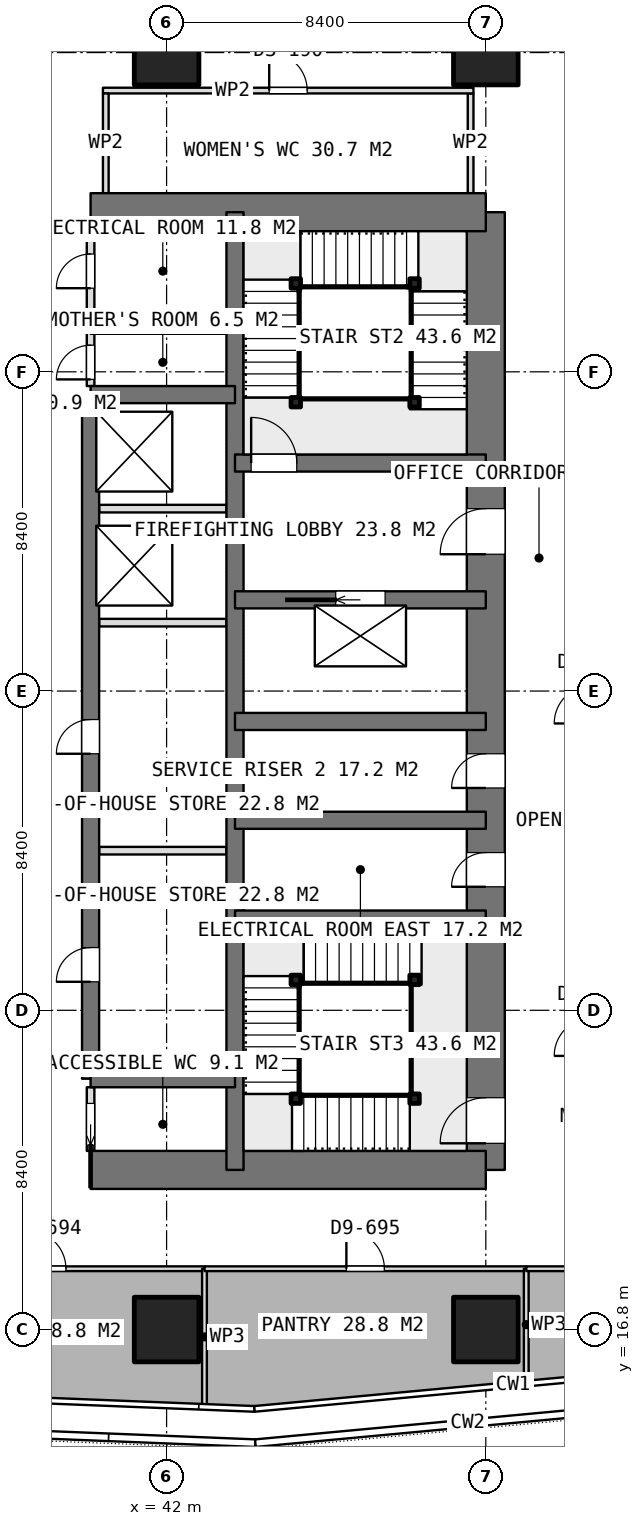
"""IFC4 building model, lengths in metres.
Left out: names, types, materials, properties, quantities, classifications, styles, units other than length and angle.
Written with IfcOpenShell. Run it as: python <this file> out.ifc"""

import sys

from ifc_helpers import new_model, si_unit, direction, frame, frame_2d, origin, origin_2d, place, context, subcontext, project, spatial, rectangle, extrude, element, fill, save


model = new_model("IFC4")
c1 = context("Model", 3, precision=1e-05, world=origin(), true_north=direction((0.0, 1.0)))
c2 = subcontext(c1, "Body", "Model", "MODEL_VIEW")
j1 = project(units=[si_unit("LENGTHUNIT", "METRE"), si_unit("PLANEANGLEUNIT", "RADIAN")], contexts=[c1])
p1 = place(None, origin())
s1 = spatial("IfcSite", under=j1, at=p1, CompositionType="ELEMENT")
p2 = place(p1, origin())
s2 = spatial("IfcBuilding", under=s1, at=p2, CompositionType="ELEMENT")
p3 = place(p2, frame((0.0, 0.0, 180.2)))
s3 = spatial("IfcBuildingStorey", under=s2, at=p3, CompositionType="ELEMENT", Elevation=180.2)
for number, where, z_axis, x_axis in (
    (1, (40.0, 21.0, 0.0), (0.0, 0.0, 1.0), (1.0, 0.0, 0.0)),
    (2, (40.0, 46.2, 0.0), (0.0, 0.0, 1.0), (1.0, 0.0, 0.0)),
):
    element("IfcWall", number, at=place(p3, frame(where, z_axis=z_axis, x_axis=x_axis)), inside=s3, PredefinedType="SHEAR", context=c2, shape_type="SweptSolid", body=[
        extrude(rectangle(XDim=10.4, YDim=1.0, at=frame_2d((5.2, 0.0))), origin(), (0.0, 0.0, 1.0), 3.75),
    ])
p4 = place(p3, frame((50.4, 21.0, 0.0), z_axis=(0.0, 0.0, 1.0), x_axis=(0.0, 1.0, 0.0)))
e3 = element("IfcWall", 3, at=p4, inside=s3, PredefinedType="SHEAR", context=c2, shape_type="SweptSolid", body=[
    extrude(rectangle(XDim=25.2, YDim=1.0, at=frame_2d((12.6, 0.0))), origin(), (0.0, 0.0, 1.0), 3.75),
])
p5 = place(p4, frame((16.2, 0.0, 0.0)))
e4 = element("IfcOpeningElement", 4, at=p5, cuts=e3, PredefinedType="OPENING", context=c2, shape_type="SweptSolid", body=[
    extrude(rectangle(XDim=1.2, YDim=2.1, at=frame_2d((0.6, 1.05))), frame((0.0, 0.51, 0.0), z_axis=(0.0, -1.0, 0.0), x_axis=(1.0, 0.0, 0.0)), (0.0, 0.0, 1.0), 1.02),
])
p6 = place(p4, frame((10.05, 0.0, 0.0)))
e5 = element("IfcOpeningElement", 5, at=p6, cuts=e3, PredefinedType="OPENING", context=c2, shape_type="SweptSolid", body=[
    extrude(rectangle(XDim=0.9, YDim=2.1, at=frame_2d((0.45, 1.05))), frame((0.0, 0.51, 0.0), z_axis=(0.0, -1.0, 0.0), x_axis=(1.0, 0.0, 0.0)), (0.0, 0.0, 1.0), 1.02),
])
p7 = place(p4, frame((7.45, 0.0, 0.0)))
e6 = element("IfcOpeningElement", 6, at=p7, cuts=e3, PredefinedType="OPENING", context=c2, shape_type="SweptSolid", body=[
    extrude(rectangle(XDim=0.9, YDim=2.1, at=frame_2d((0.45, 1.05))), frame((0.0, 0.51, 0.0), z_axis=(0.0, -1.0, 0.0), x_axis=(1.0, 0.0, 0.0)), (0.0, 0.0, 1.0), 1.02),
])
p8 = place(p4, frame((0.7, 0.0, 0.0)))
e7 = element("IfcOpeningElement", 7, at=p8, cuts=e3, PredefinedType="OPENING", context=c2, shape_type="SweptSolid", body=[
    extrude(rectangle(XDim=1.2, YDim=2.1, at=frame_2d((0.6, 1.05))), frame((0.0, 0.51, 0.0), z_axis=(0.0, -1.0, 0.0), x_axis=(1.0, 0.0, 0.0)), (0.0, 0.0, 1.0), 1.02),
])
p9 = place(p3, frame((43.8, 21.0, 0.0), z_axis=(0.0, 0.0, 1.0), x_axis=(0.0, 1.0, 0.0)))
e8 = element("IfcWall", 8, at=p9, inside=s3, PredefinedType="SHEAR", context=c2, shape_type="SweptSolid", body=[
    extrude(rectangle(XDim=25.2, YDim=0.45, at=frame_2d((12.6, 0.0))), origin(), (0.0, 0.0, 1.0), 3.75),
])
p10 = place(p3, frame((40.0, 23.4, 0.0), z_axis=(0.0, 0.0, 1.0), x_axis=(0.0, 1.0, 0.0)))
e9 = element("IfcWall", 9, at=p10, inside=s3, PredefinedType="SHEAR", context=c2, shape_type="SweptSolid", body=[
    extrude(rectangle(XDim=18.0, YDim=0.45, at=frame_2d((9.0, 0.0))), origin(), (0.0, 0.0, 1.0), 3.75),
])
p11 = place(p10, frame((2.55, 0.0, 0.0)))
e10 = element("IfcOpeningElement", 10, at=p11, cuts=e9, PredefinedType="OPENING", context=c2, shape_type="SweptSolid", body=[
    extrude(rectangle(XDim=0.9, YDim=2.1, at=frame_2d((0.45, 1.05))), frame((0.0, 0.235, 0.0), z_axis=(0.0, -1.0, 0.0), x_axis=(1.0, 0.0, 0.0)), (0.0, 0.0, 1.0), 0.47),
])
p12 = place(p10, frame((8.55, 0.0, 0.0)))
e11 = element("IfcOpeningElement", 11, at=p12, cuts=e9, PredefinedType="OPENING", context=c2, shape_type="SweptSolid", body=[
    extrude(rectangle(XDim=0.9, YDim=2.1, at=frame_2d((0.45, 1.05))), frame((0.0, 0.235, 0.0), z_axis=(0.0, -1.0, 0.0), x_axis=(1.0, 0.0, 0.0)), (0.0, 0.0, 1.0), 0.47),
])
for number, where, z_axis, x_axis in (
    (12, (40.0, 23.4, 0.0), (0.0, 0.0, 1.0), (1.0, 0.0, 0.0)),
    (13, (40.0, 41.4, 0.0), (0.0, 0.0, 1.0), (1.0, 0.0, 0.0)),
):
    element("IfcWall", number, at=place(p3, frame(where, z_axis=z_axis, x_axis=x_axis)), inside=s3, PredefinedType="SHEAR", context=c2, shape_type="SweptSolid", body=[
        extrude(rectangle(XDim=3.8, YDim=0.45, at=frame_2d((1.9, 0.0))), origin(), (0.0, 0.0, 1.0), 3.75),
    ])
for number, where, z_axis, x_axis in (
    (14, (43.8, 27.6, 0.0), (0.0, 0.0, 1.0), (1.0, 0.0, 0.0)),
    (15, (43.8, 30.2, 0.0), (0.0, 0.0, 1.0), (1.0, 0.0, 0.0)),
    (16, (43.8, 32.8, 0.0), (0.0, 0.0, 1.0), (1.0, 0.0, 0.0)),
):
    element("IfcWall", number, at=place(p3, frame(where, z_axis=z_axis, x_axis=x_axis)), inside=s3, PredefinedType="SHEAR", context=c2, shape_type="SweptSolid", body=[
        extrude(rectangle(XDim=6.6, YDim=0.45, at=frame_2d((3.3, 0.0))), origin(), (0.0, 0.0, 1.0), 3.75),
    ])
p13 = place(p3, frame((43.8, 36.0, 0.0), z_axis=(0.0, 0.0, 1.0), x_axis=(1.0, 0.0, 0.0)))
e17 = element("IfcWall", 17, at=p13, inside=s3, PredefinedType="SHEAR", context=c2, shape_type="SweptSolid", body=[
    extrude(rectangle(XDim=6.6, YDim=0.45, at=frame_2d((3.3, 0.0))), origin(), (0.0, 0.0, 1.0), 3.75),
])
p14 = place(p13, frame((2.65, 0.0, 0.0)))
e18 = element("IfcOpeningElement", 18, at=p14, cuts=e17, PredefinedType="OPENING", context=c2, shape_type="SweptSolid", body=[
    extrude(rectangle(XDim=1.3, YDim=2.1, at=frame_2d((0.65, 1.05))), frame((0.0, 0.235, 0.0), z_axis=(0.0, -1.0, 0.0), x_axis=(1.0, 0.0, 0.0)), (0.0, 0.0, 1.0), 0.47),
])
p15 = place(p3, frame((43.8, 39.6, 0.0), z_axis=(0.0, 0.0, 1.0), x_axis=(1.0, 0.0, 0.0)))
e19 = element("IfcWall", 19, at=p15, inside=s3, PredefinedType="SHEAR", context=c2, shape_type="SweptSolid", body=[
    extrude(rectangle(XDim=6.6, YDim=0.45, at=frame_2d((3.3, 0.0))), origin(), (0.0, 0.0, 1.0), 3.75),
])
p16 = place(p15, frame((0.425, 0.0, 0.0)))
e20 = element("IfcOpeningElement", 20, at=p16, cuts=e19, PredefinedType="OPENING", context=c2, shape_type="SweptSolid", body=[
    extrude(rectangle(XDim=1.2, YDim=2.1, at=frame_2d((0.6, 1.05))), frame((0.0, 0.235, 0.0), z_axis=(0.0, -1.0, 0.0), x_axis=(1.0, 0.0, 0.0)), (0.0, 0.0, 1.0), 0.47),
])
for number, where, z_axis, x_axis in (
    (21, (42.0, 16.8, 0.0), (0.0, 0.0, 1.0), (1.0, 0.0, 0.0)),
    (22, (42.0, 50.4, 0.0), (0.0, 0.0, 1.0), (1.0, 0.0, 0.0)),
    (23, (50.4, 16.8, 0.0), (0.0, 0.0, 1.0), (1.0, 0.0, 0.0)),
    (24, (50.4, 50.4, 0.0), (0.0, 0.0, 1.0), (1.0, 0.0, 0.0)),
):
    element("IfcColumn", number, at=place(p3, frame(where, z_axis=z_axis, x_axis=x_axis)), inside=s3, PredefinedType="COLUMN", context=c2, shape_type="SweptSolid", body=[
        extrude(rectangle(XDim=1.7, YDim=1.7, at=origin_2d()), origin(), (0.0, 0.0, 1.0), 3.75),
    ])
for number, where, z_axis, x_axis in (
    (25, (40.225, 29.4, 0.0), (0.0, 0.0, 1.0), (1.0, 0.0, 0.0)),
    (26, (40.225, 35.4, 0.0), (0.0, 0.0, 1.0), (1.0, 0.0, 0.0)),
    (27, (40.225, 38.4, 0.0), (0.0, 0.0, 1.0), (1.0, 0.0, 0.0)),
):
    element("IfcWall", number, at=place(p3, frame(where, z_axis=z_axis, x_axis=x_axis)), inside=s3, PredefinedType="PARTITIONING", context=c2, shape_type="SweptSolid", body=[
        extrude(rectangle(XDim=3.35, YDim=0.2, at=frame_2d((1.675, 0.0))), origin(), (0.0, 0.0, 1.0), 3.5),
    ])
p17 = place(p3, frame((40.0, 21.5, 0.0), z_axis=(0.0, 0.0, 1.0), x_axis=(0.0, 1.0, 0.0)))
e28 = element("IfcWall", 28, at=p17, inside=s3, PredefinedType="PARTITIONING", context=c2, shape_type="SweptSolid", body=[
    extrude(rectangle(XDim=1.675, YDim=0.2, at=frame_2d((0.837, 0.0))), origin(), (0.0, 0.0, 1.0), 3.5),
])
p18 = place(p17, frame((0.15, 0.0, 0.0)))
e29 = element("IfcOpeningElement", 29, at=p18, cuts=e28, PredefinedType="OPENING", context=c2, shape_type="SweptSolid", body=[
    extrude(rectangle(XDim=1.1, YDim=2.1, at=frame_2d((0.55, 1.05))), frame((0.0, 0.11, 0.0), z_axis=(0.0, -1.0, 0.0), x_axis=(1.0, 0.0, 0.0)), (0.0, 0.0, 1.0), 0.22),
])
p19 = place(p3, frame((40.0, 41.625, 0.0), z_axis=(0.0, 0.0, 1.0), x_axis=(0.0, 1.0, 0.0)))
e30 = element("IfcWall", 30, at=p19, inside=s3, PredefinedType="PARTITIONING", context=c2, shape_type="SweptSolid", body=[
    extrude(rectangle(XDim=4.075, YDim=0.2, at=frame_2d((2.038, 0.0))), origin(), (0.0, 0.0, 1.0), 3.5),
])
p20 = place(p19, frame((2.575, 0.0, 0.0)))
e31 = element("IfcOpeningElement", 31, at=p20, cuts=e30, PredefinedType="OPENING", context=c2, shape_type="SweptSolid", body=[
    extrude(rectangle(XDim=0.9, YDim=2.1, at=frame_2d((0.45, 1.05))), frame((0.0, 0.11, 0.0), z_axis=(0.0, -1.0, 0.0), x_axis=(1.0, 0.0, 0.0)), (0.0, 0.0, 1.0), 0.22),
])
p21 = place(p19, frame((0.175, 0.0, 0.0)))
e32 = element("IfcOpeningElement", 32, at=p21, cuts=e30, PredefinedType="OPENING", context=c2, shape_type="SweptSolid", body=[
    extrude(rectangle(XDim=0.9, YDim=2.1, at=frame_2d((0.45, 1.05))), frame((0.0, 0.11, 0.0), z_axis=(0.0, -1.0, 0.0), x_axis=(1.0, 0.0, 0.0)), (0.0, 0.0, 1.0), 0.22),
])
p22 = place(p3, frame((40.0, 43.1, 0.0), z_axis=(0.0, 0.0, 1.0), x_axis=(1.0, 0.0, 0.0)))
e33 = element("IfcWall", 33, at=p22, inside=s3, PredefinedType="PARTITIONING", context=c2, shape_type="SweptSolid", body=[
    extrude(rectangle(XDim=3.575, YDim=0.2, at=frame_2d((1.788, 0.0))), origin(), (0.0, 0.0, 1.0), 3.5),
])
p23 = place(p3, frame((40.325, 49.4, 0.0), z_axis=(0.0, 0.0, 1.0), x_axis=(1.0, 0.0, 0.0)))
e34 = element("IfcWall", 34, at=p23, inside=s3, PredefinedType="PARTITIONING", context=c2, shape_type="SweptSolid", body=[
    extrude(rectangle(XDim=9.75, YDim=0.15, at=frame_2d((4.875, 0.0))), origin(), (0.0, 0.0, 1.0), 3.5),
])
p24 = place(p23, frame((4.375, 0.0, 0.0)))
e35 = element("IfcOpeningElement", 35, at=p24, cuts=e34, PredefinedType="OPENING", context=c2, shape_type="SweptSolid", body=[
    extrude(rectangle(XDim=1.0, YDim=2.1, at=frame_2d((0.5, 1.05))), frame((0.0, 0.085, 0.0), z_axis=(0.0, -1.0, 0.0), x_axis=(1.0, 0.0, 0.0)), (0.0, 0.0, 1.0), 0.17),
])
for number, where, z_axis, x_axis in (
    (36, (40.4, 46.7, 0.0), (0.0, 0.0, 1.0), (0.0, 1.0, 0.0)),
    (37, (50.0, 46.7, 0.0), (0.0, 0.0, 1.0), (0.0, 1.0, 0.0)),
):
    element("IfcWall", number, at=place(p3, frame(where, z_axis=z_axis, x_axis=x_axis)), inside=s3, PredefinedType="PARTITIONING", context=c2, shape_type="SweptSolid", body=[
        extrude(rectangle(XDim=2.625, YDim=0.15, at=frame_2d((1.312, 0.0))), origin(), (0.0, 0.0, 1.0), 3.5),
    ])
p25 = place(p3, frame((34.706, 18.4, 0.0), z_axis=(0.0, 0.0, 1.0), x_axis=(1.0, 0.0, 0.0)))
e38 = element("IfcWall", 38, at=p25, inside=s3, PredefinedType="PARTITIONING", context=c2, shape_type="SweptSolid", body=[
    extrude(rectangle(XDim=8.291, YDim=0.125, at=frame_2d((4.146, 0.0))), origin(), (0.0, 0.0, 1.0), 3.5),
])
p26 = place(p25, frame((3.645, 0.0, 0.0)))
e39 = element("IfcOpeningElement", 39, at=p26, cuts=e38, PredefinedType="OPENING", context=c2, shape_type="SweptSolid", body=[
    extrude(rectangle(XDim=1.0, YDim=2.1, at=frame_2d((0.5, 1.05))), frame((0.0, 0.073, 0.0), z_axis=(0.0, -1.0, 0.0), x_axis=(1.0, 0.0, 0.0)), (0.0, 0.0, 1.0), 0.145),
])
p27 = place(p3, frame((42.997, 18.4, 0.0), z_axis=(0.0, 0.0, 1.0), x_axis=(0.0, -1.0, 0.0)))
e40 = element("IfcWall", 40, at=p27, inside=s3, PredefinedType="PARTITIONING", context=c2, shape_type="SweptSolid", body=[
    extrude(rectangle(XDim=3.586, YDim=0.125, at=frame_2d((1.793, 0.0))), origin(), (0.0, 0.0, 1.0), 3.5),
])
p28 = place(p3, frame((42.998, 18.4, 0.0), z_axis=(0.0, 0.0, 1.0), x_axis=(1.0, 0.0, 0.0)))
e41 = element("IfcWall", 41, at=p28, inside=s3, PredefinedType="PARTITIONING", context=c2, shape_type="SweptSolid", body=[
    extrude(rectangle(XDim=8.466, YDim=0.125, at=frame_2d((4.233, 0.0))), origin(), (0.0, 0.0, 1.0), 3.5),
])
p29 = place(p28, frame((3.733, 0.0, 0.0)))
e42 = element("IfcOpeningElement", 42, at=p29, cuts=e41, PredefinedType="OPENING", context=c2, shape_type="SweptSolid", body=[
    extrude(rectangle(XDim=1.0, YDim=2.1, at=frame_2d((0.5, 1.05))), frame((0.0, 0.073, 0.0), z_axis=(0.0, -1.0, 0.0), x_axis=(1.0, 0.0, 0.0)), (0.0, 0.0, 1.0), 0.145),
])
p30 = place(p3, frame((51.464, 18.4, 0.0), z_axis=(0.0, 0.0, 1.0), x_axis=(0.0, -1.0, 0.0)))
e43 = element("IfcWall", 43, at=p30, inside=s3, PredefinedType="PARTITIONING", context=c2, shape_type="SweptSolid", body=[
    extrude(rectangle(XDim=2.942, YDim=0.125, at=frame_2d((1.471, 0.0))), origin(), (0.0, 0.0, 1.0), 3.5),
])
p31 = place(p3, frame((51.465, 18.4, 0.0), z_axis=(0.0, 0.0, 1.0), x_axis=(1.0, 0.0, 0.0)))
e44 = element("IfcWall", 44, at=p31, inside=s3, PredefinedType="PARTITIONING", context=c2, shape_type="SweptSolid", body=[
    extrude(rectangle(XDim=4.935, YDim=0.125, at=frame_2d((2.467, 0.0))), origin(), (0.0, 0.0, 1.0), 3.5),
])
p32 = place(p31, frame((1.968, 0.0, 0.0)))
e45 = element("IfcOpeningElement", 45, at=p32, cuts=e44, PredefinedType="OPENING", context=c2, shape_type="SweptSolid", body=[
    extrude(rectangle(XDim=1.0, YDim=2.1, at=frame_2d((0.5, 1.05))), frame((0.0, 0.073, 0.0), z_axis=(0.0, -1.0, 0.0), x_axis=(1.0, 0.0, 0.0)), (0.0, 0.0, 1.0), 0.145),
])
for number, where, z_axis, x_axis in (
    (46, (45.4, 41.2, 0.0), (0.0, 0.0, 1.0), (1.0, 0.0, 0.0)),
    (47, (45.4, 44.325, 0.0), (0.0, 0.0, 1.0), (1.0, 0.0, 0.0)),
    (48, (48.525, 44.325, 0.0), (0.0, 0.0, 1.0), (1.0, 0.0, 0.0)),
    (49, (48.525, 41.2, 0.0), (0.0, 0.0, 1.0), (1.0, 0.0, 0.0)),
    (50, (48.525, 22.875, 0.0), (0.0, 0.0, 1.0), (1.0, 0.0, 0.0)),
    (51, (45.4, 22.875, 0.0), (0.0, 0.0, 1.0), (1.0, 0.0, 0.0)),
    (52, (45.4, 26.0, 0.0), (0.0, 0.0, 1.0), (1.0, 0.0, 0.0)),
    (53, (48.525, 26.0, 0.0), (0.0, 0.0, 1.0), (1.0, 0.0, 0.0)),
):
    element("IfcColumn", number, at=place(p3, frame(where, z_axis=z_axis, x_axis=x_axis)), inside=s3, PredefinedType="COLUMN", context=c2, shape_type="SweptSolid", body=[
        extrude(rectangle(XDim=0.25, YDim=0.25, at=origin_2d()), origin(), (0.0, 0.0, 1.0), 3.75),
    ])
p33 = place(p5, origin())
e54 = element("IfcDoor", 54, at=p33, inside=s3, OperationType="SINGLE_SWING_LEFT", PredefinedType="DOOR", context=c2, shape_type="SweptSolid", body=[
    extrude(rectangle(XDim=1.2, YDim=2.1, at=frame_2d((0.6, 1.05))), frame((0.0, 0.025, 0.0), z_axis=(0.0, -1.0, 0.0), x_axis=(1.0, 0.0, 0.0)), (0.0, 0.0, 1.0), 0.05),
])
fill(e4, e54)
p34 = place(p6, origin())
e55 = element("IfcDoor", 55, at=p34, inside=s3, OperationType="SINGLE_SWING_LEFT", PredefinedType="DOOR", context=c2, shape_type="SweptSolid", body=[
    extrude(rectangle(XDim=0.9, YDim=2.1, at=frame_2d((0.45, 1.05))), frame((0.0, 0.025, 0.0), z_axis=(0.0, -1.0, 0.0), x_axis=(1.0, 0.0, 0.0)), (0.0, 0.0, 1.0), 0.05),
])
fill(e5, e55)
p35 = place(p7, origin())
e56 = element("IfcDoor", 56, at=p35, inside=s3, OperationType="SINGLE_SWING_LEFT", PredefinedType="DOOR", context=c2, shape_type="SweptSolid", body=[
    extrude(rectangle(XDim=0.9, YDim=2.1, at=frame_2d((0.45, 1.05))), frame((0.0, 0.025, 0.0), z_axis=(0.0, -1.0, 0.0), x_axis=(1.0, 0.0, 0.0)), (0.0, 0.0, 1.0), 0.05),
])
fill(e6, e56)
p36 = place(p18, origin())
e57 = element("IfcDoor", 57, at=p36, inside=s3, OperationType="SLIDING_TO_LEFT", PredefinedType="DOOR", context=c2, shape_type="SweptSolid", body=[
    extrude(rectangle(XDim=1.1, YDim=2.1, at=frame_2d((0.55, 1.05))), frame((0.0, 0.025, 0.0), z_axis=(0.0, -1.0, 0.0), x_axis=(1.0, 0.0, 0.0)), (0.0, 0.0, 1.0), 0.05),
])
fill(e29, e57)
p37 = place(p20, origin())
e58 = element("IfcDoor", 58, at=p37, inside=s3, OperationType="SINGLE_SWING_LEFT", PredefinedType="DOOR", context=c2, shape_type="SweptSolid", body=[
    extrude(rectangle(XDim=0.9, YDim=2.1, at=frame_2d((0.45, 1.05))), frame((0.0, 0.025, 0.0), z_axis=(0.0, -1.0, 0.0), x_axis=(1.0, 0.0, 0.0)), (0.0, 0.0, 1.0), 0.05),
])
fill(e31, e58)
p38 = place(p21, origin())
e59 = element("IfcDoor", 59, at=p38, inside=s3, OperationType="SINGLE_SWING_LEFT", PredefinedType="DOOR", context=c2, shape_type="SweptSolid", body=[
    extrude(rectangle(XDim=0.9, YDim=2.1, at=frame_2d((0.45, 1.05))), frame((0.0, 0.025, 0.0), z_axis=(0.0, -1.0, 0.0), x_axis=(1.0, 0.0, 0.0)), (0.0, 0.0, 1.0), 0.05),
])
fill(e32, e59)
p39 = place(p11, origin())
e60 = element("IfcDoor", 60, at=p39, inside=s3, OperationType="SINGLE_SWING_LEFT", PredefinedType="DOOR", context=c2, shape_type="SweptSolid", body=[
    extrude(rectangle(XDim=0.9, YDim=2.1, at=frame_2d((0.45, 1.05))), frame((0.0, 0.025, 0.0), z_axis=(0.0, -1.0, 0.0), x_axis=(1.0, 0.0, 0.0)), (0.0, 0.0, 1.0), 0.05),
])
fill(e10, e60)
p40 = place(p12, origin())
e61 = element("IfcDoor", 61, at=p40, inside=s3, OperationType="SINGLE_SWING_LEFT", PredefinedType="DOOR", context=c2, shape_type="SweptSolid", body=[
    extrude(rectangle(XDim=0.9, YDim=2.1, at=frame_2d((0.45, 1.05))), frame((0.0, 0.025, 0.0), z_axis=(0.0, -1.0, 0.0), x_axis=(1.0, 0.0, 0.0)), (0.0, 0.0, 1.0), 0.05),
])
fill(e11, e61)
p41 = place(p14, origin())
e62 = element("IfcDoor", 62, at=p41, inside=s3, OperationType="SLIDING_TO_LEFT", PredefinedType="USERDEFINED", context=c2, shape_type="SweptSolid", body=[
    extrude(rectangle(XDim=1.3, YDim=2.1, at=frame_2d((0.65, 1.05))), frame((0.0, 0.025, 0.0), z_axis=(0.0, -1.0, 0.0), x_axis=(1.0, 0.0, 0.0)), (0.0, 0.0, 1.0), 0.05),
])
fill(e18, e62)
p42 = place(p24, origin())
e63 = element("IfcDoor", 63, at=p42, inside=s3, OperationType="SINGLE_SWING_LEFT", PredefinedType="DOOR", context=c2, shape_type="SweptSolid", body=[
    extrude(rectangle(XDim=1.0, YDim=2.1, at=frame_2d((0.5, 1.05))), frame((0.0, 0.025, 0.0), z_axis=(0.0, -1.0, 0.0), x_axis=(1.0, 0.0, 0.0)), (0.0, 0.0, 1.0), 0.05),
])
fill(e35, e63)
p43 = place(p26, origin())
e64 = element("IfcDoor", 64, at=p43, inside=s3, OperationType="SINGLE_SWING_LEFT", PredefinedType="DOOR", context=c2, shape_type="SweptSolid", body=[
    extrude(rectangle(XDim=1.0, YDim=2.1, at=frame_2d((0.5, 1.05))), frame((0.0, 0.025, 0.0), z_axis=(0.0, -1.0, 0.0), x_axis=(1.0, 0.0, 0.0)), (0.0, 0.0, 1.0), 0.05),
])
fill(e39, e64)
p44 = place(p29, origin())
e65 = element("IfcDoor", 65, at=p44, inside=s3, OperationType="SINGLE_SWING_LEFT", PredefinedType="DOOR", context=c2, shape_type="SweptSolid", body=[
    extrude(rectangle(XDim=1.0, YDim=2.1, at=frame_2d((0.5, 1.05))), frame((0.0, 0.025, 0.0), z_axis=(0.0, -1.0, 0.0), x_axis=(1.0, 0.0, 0.0)), (0.0, 0.0, 1.0), 0.05),
])
fill(e42, e65)
p45 = place(p16, origin())
e66 = element("IfcDoor", 66, at=p45, inside=s3, OperationType="SINGLE_SWING_RIGHT", PredefinedType="DOOR", context=c2, shape_type="SweptSolid", body=[
    extrude(rectangle(XDim=1.2, YDim=2.1, at=frame_2d((0.6, 1.05))), frame((0.0, 0.025, 0.0), z_axis=(0.0, -1.0, 0.0), x_axis=(1.0, 0.0, 0.0)), (0.0, 0.0, 1.0), 0.05),
])
fill(e20, e66)
p46 = place(p8, origin())
e67 = element("IfcDoor", 67, at=p46, inside=s3, OperationType="SINGLE_SWING_RIGHT", PredefinedType="DOOR", context=c2, shape_type="SweptSolid", body=[
    extrude(rectangle(XDim=1.2, YDim=2.1, at=frame_2d((0.6, 1.05))), frame((0.0, 0.025, 0.0), z_axis=(0.0, -1.0, 0.0), x_axis=(1.0, 0.0, 0.0)), (0.0, 0.0, 1.0), 0.05),
])
fill(e7, e67)
save(model, sys.argv[1])
